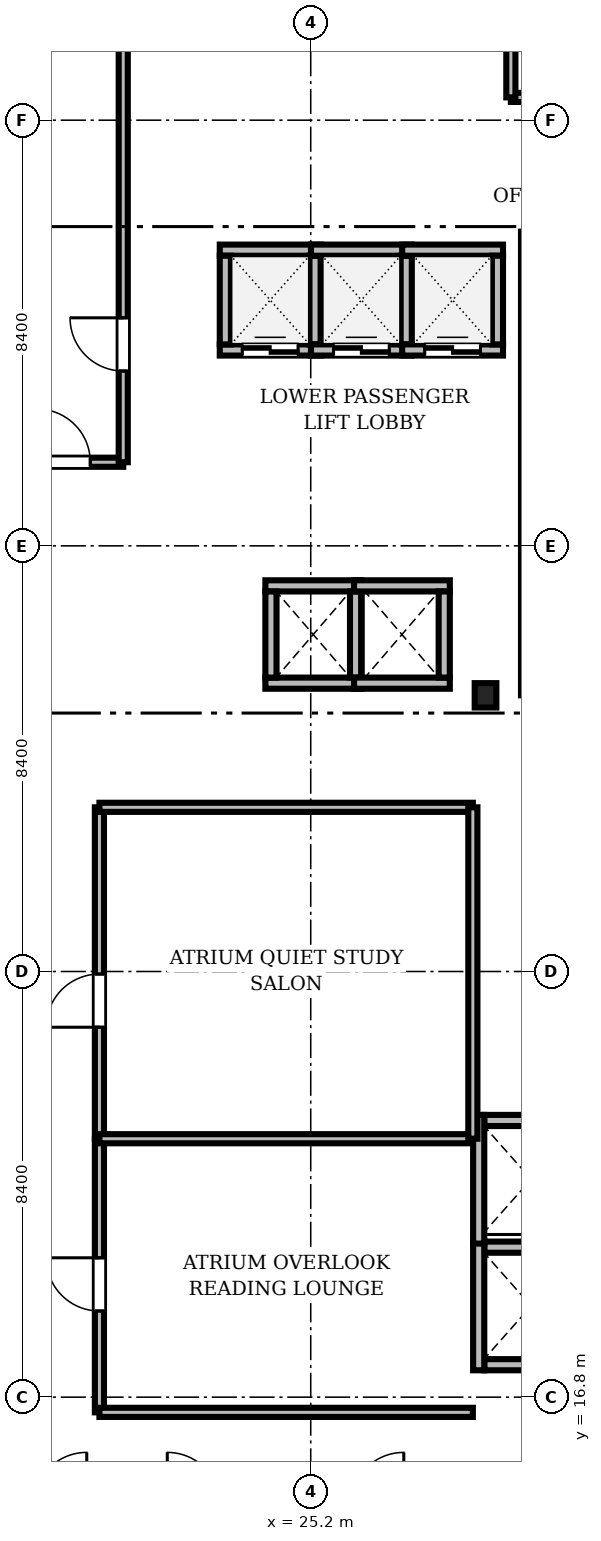
"""IFC4 building model, lengths in metres.
Left out: names, types, materials, properties, quantities, classifications, styles, units other than length and angle.
Written with IfcOpenShell. Run it as: python <this file> out.ifc"""

import sys

from ifc_helpers import new_model, si_unit, direction, frame, frame_2d, origin, origin_2d, place, context, subcontext, project, spatial, rectangle, i_section, extrude, source, transform, mapped, element, fill, save


model = new_model("IFC4")
c1 = context("Model", 3, precision=1e-05, world=origin(), true_north=direction((0.0, 1.0)))
c2 = subcontext(c1, "Body", "Model", "MODEL_VIEW")
j1 = project(units=[si_unit("LENGTHUNIT", "METRE"), si_unit("PLANEANGLEUNIT", "RADIAN")], contexts=[c1])
p1 = place(None, origin())
s1 = spatial("IfcSite", under=j1, at=p1, CompositionType="ELEMENT")
p2 = place(p1, origin())
s2 = spatial("IfcBuilding", under=s1, at=p2, CompositionType="ELEMENT")
p3 = place(p2, frame((0.0, 0.0, 64.1)))
s3 = spatial("IfcBuildingStorey", under=s2, at=p3, CompositionType="ELEMENT", Elevation=64.1)
m1 = source(origin(), c2, "Body", "SweptSolid", [
    extrude(i_section(OverallWidth=0.428, OverallDepth=0.481, WebThickness=0.04, FlangeThickness=0.063, FilletRadius=0.015, at=origin_2d()), origin(), (0.0, 0.0, 1.0), 3.41),
])
p4 = place(p3, frame((28.65, 30.65, 0.0), z_axis=(0.0, 0.0, 1.0), x_axis=(1.0, 0.0, 0.0)))
e1 = element("IfcColumn", 1, at=p4, inside=s3, PredefinedType="COLUMN", context=c2, shape_type="MappedRepresentation", body=[
    mapped(m1, transform((0.0, 0.0, 0.0), scale=1.0)),
])
m2 = source(origin(), c2, "Body", "SweptSolid", [
    extrude(rectangle(XDim=1.99, YDim=0.22, at=frame_2d((0.995, 0.0))), origin(), (0.0, 0.0, 1.0), 3.41),
])
p5 = place(p3, frame((23.405, 37.465, 0.0), z_axis=(0.0, 0.0, 1.0), x_axis=(1.0, 0.0, 0.0)))
e2 = element("IfcWall", 2, at=p5, inside=s3, PredefinedType="SOLIDWALL", context=c2, shape_type="MappedRepresentation", body=[
    mapped(m2, transform((0.0, 0.0, 0.0), scale=1.0)),
])
m3 = source(origin(), c2, "Body", "SweptSolid", [
    extrude(rectangle(XDim=1.1, YDim=2.2, at=frame_2d((0.55, 1.1))), frame((0.0, 0.12, 0.0), z_axis=(0.0, -1.0, 0.0), x_axis=(1.0, 0.0, 0.0)), (0.0, 0.0, 1.0), 0.24),
])
p6 = place(p5, frame((0.445, 0.0, 0.0)))
e3 = element("IfcOpeningElement", 3, at=p6, cuts=e2, PredefinedType="OPENING", context=c2, shape_type="MappedRepresentation", body=[
    mapped(m3, transform((0.0, 0.0, 0.0), scale=1.0)),
])
p7 = place(p3, frame((23.405, 39.435, 0.0), z_axis=(0.0, 0.0, 1.0), x_axis=(1.0, 0.0, 0.0)))
e4 = element("IfcWall", 4, at=p7, inside=s3, PredefinedType="SOLIDWALL", context=c2, shape_type="MappedRepresentation", body=[
    mapped(m2, transform((0.0, 0.0, 0.0), scale=1.0)),
])
m4 = source(origin(), c2, "Body", "SweptSolid", [
    extrude(rectangle(XDim=1.75, YDim=0.22, at=frame_2d((0.875, 0.0))), origin(), (0.0, 0.0, 1.0), 3.41),
])
for number, where, z_axis, x_axis in (
    (5, (23.515, 37.575, 0.0), (0.0, 0.0, 1.0), (0.0, 1.0, 0.0)),
    (6, (25.285, 37.575, 0.0), (0.0, 0.0, 1.0), (0.0, 1.0, 0.0)),
):
    element("IfcWall", number, at=place(p3, frame(where, z_axis=z_axis, x_axis=x_axis)), inside=s3, PredefinedType="SOLIDWALL", context=c2, shape_type="MappedRepresentation", body=[
        mapped(m4, transform((0.0, 0.0, 0.0), scale=1.0)),
    ])
p8 = place(p3, frame((25.205, 37.465, 0.0), z_axis=(0.0, 0.0, 1.0), x_axis=(1.0, 0.0, 0.0)))
e7 = element("IfcWall", 7, at=p8, inside=s3, PredefinedType="SOLIDWALL", context=c2, shape_type="MappedRepresentation", body=[
    mapped(m2, transform((0.0, 0.0, 0.0), scale=1.0)),
])
p9 = place(p8, frame((0.445, 0.0, 0.0)))
e8 = element("IfcOpeningElement", 8, at=p9, cuts=e7, PredefinedType="OPENING", context=c2, shape_type="MappedRepresentation", body=[
    mapped(m3, transform((0.0, 0.0, 0.0), scale=1.0)),
])
p10 = place(p3, frame((25.205, 39.435, 0.0), z_axis=(0.0, 0.0, 1.0), x_axis=(1.0, 0.0, 0.0)))
e9 = element("IfcWall", 9, at=p10, inside=s3, PredefinedType="SOLIDWALL", context=c2, shape_type="MappedRepresentation", body=[
    mapped(m2, transform((0.0, 0.0, 0.0), scale=1.0)),
])
p11 = place(p3, frame((27.085, 37.575, 0.0), z_axis=(0.0, 0.0, 1.0), x_axis=(0.0, 1.0, 0.0)))
e10 = element("IfcWall", 10, at=p11, inside=s3, PredefinedType="SOLIDWALL", context=c2, shape_type="MappedRepresentation", body=[
    mapped(m4, transform((0.0, 0.0, 0.0), scale=1.0)),
])
m5 = source(origin(), c2, "Body", "SweptSolid", [
    extrude(rectangle(XDim=1.99, YDim=0.22, at=frame_2d((0.995, 0.0))), origin(), (0.0, 0.0, 1.0), 3.41),
])
p12 = place(p3, frame((27.005, 37.465, 0.0), z_axis=(0.0, 0.0, 1.0), x_axis=(1.0, 0.0, 0.0)))
e11 = element("IfcWall", 11, at=p12, inside=s3, PredefinedType="SOLIDWALL", context=c2, shape_type="MappedRepresentation", body=[
    mapped(m5, transform((0.0, 0.0, 0.0), scale=1.0)),
])
p13 = place(p12, frame((0.445, 0.0, 0.0)))
e12 = element("IfcOpeningElement", 12, at=p13, cuts=e11, PredefinedType="OPENING", context=c2, shape_type="MappedRepresentation", body=[
    mapped(m3, transform((0.0, 0.0, 0.0), scale=1.0)),
])
p14 = place(p3, frame((27.005, 39.435, 0.0), z_axis=(0.0, 0.0, 1.0), x_axis=(1.0, 0.0, 0.0)))
e13 = element("IfcWall", 13, at=p14, inside=s3, PredefinedType="SOLIDWALL", context=c2, shape_type="MappedRepresentation", body=[
    mapped(m5, transform((0.0, 0.0, 0.0), scale=1.0)),
])
p15 = place(p3, frame((28.885, 37.575, 0.0), z_axis=(0.0, 0.0, 1.0), x_axis=(0.0, 1.0, 0.0)))
e14 = element("IfcWall", 14, at=p15, inside=s3, PredefinedType="SOLIDWALL", context=c2, shape_type="MappedRepresentation", body=[
    mapped(m4, transform((0.0, 0.0, 0.0), scale=1.0)),
])
m6 = source(origin(), c2, "Body", "SweptSolid", [
    extrude(rectangle(XDim=1.89, YDim=0.22, at=frame_2d((0.945, 0.0))), origin(), (0.0, 0.0, 1.0), 3.41),
])
for number, where, z_axis, x_axis in (
    (15, (24.305, 30.89, 0.0), (0.0, 0.0, 1.0), (1.0, 0.0, 0.0)),
    (16, (24.305, 32.81, 0.0), (0.0, 0.0, 1.0), (1.0, 0.0, 0.0)),
):
    element("IfcWall", number, at=place(p3, frame(where, z_axis=z_axis, x_axis=x_axis)), inside=s3, PredefinedType="SOLIDWALL", context=c2, shape_type="MappedRepresentation", body=[
        mapped(m6, transform((0.0, 0.0, 0.0), scale=1.0)),
    ])
m7 = source(origin(), c2, "Body", "SweptSolid", [
    extrude(rectangle(XDim=1.7, YDim=0.22, at=frame_2d((0.85, 0.0))), origin(), (0.0, 0.0, 1.0), 3.41),
])
for number, where, z_axis, x_axis in (
    (17, (24.415, 31.0, 0.0), (0.0, 0.0, 1.0), (0.0, 1.0, 0.0)),
    (18, (26.085, 31.0, 0.0), (0.0, 0.0, 1.0), (0.0, 1.0, 0.0)),
):
    element("IfcWall", number, at=place(p3, frame(where, z_axis=z_axis, x_axis=x_axis)), inside=s3, PredefinedType="SOLIDWALL", context=c2, shape_type="MappedRepresentation", body=[
        mapped(m7, transform((0.0, 0.0, 0.0), scale=1.0)),
    ])
for number, where, z_axis, x_axis in (
    (19, (26.055, 30.89, 0.0), (0.0, 0.0, 1.0), (1.0, 0.0, 0.0)),
    (20, (26.055, 32.81, 0.0), (0.0, 0.0, 1.0), (1.0, 0.0, 0.0)),
):
    element("IfcWall", number, at=place(p3, frame(where, z_axis=z_axis, x_axis=x_axis)), inside=s3, PredefinedType="SOLIDWALL", context=c2, shape_type="MappedRepresentation", body=[
        mapped(m6, transform((0.0, 0.0, 0.0), scale=1.0)),
    ])
p16 = place(p3, frame((27.835, 31.0, 0.0), z_axis=(0.0, 0.0, 1.0), x_axis=(0.0, 1.0, 0.0)))
e21 = element("IfcWall", 21, at=p16, inside=s3, PredefinedType="SOLIDWALL", context=c2, shape_type="MappedRepresentation", body=[
    mapped(m7, transform((0.0, 0.0, 0.0), scale=1.0)),
])
m8 = source(origin(), c2, "Body", "SweptSolid", [
    extrude(rectangle(XDim=1.85, YDim=0.22, at=frame_2d((0.925, 0.0))), origin(), (0.0, 0.0, 1.0), 3.41),
])
for number, where, z_axis, x_axis in (
    (22, (28.625, 17.44, 0.0), (0.0, 0.0, 1.0), (1.0, 0.0, 0.0)),
    (23, (28.625, 19.76, 0.0), (0.0, 0.0, 1.0), (1.0, 0.0, 0.0)),
):
    element("IfcWall", number, at=place(p3, frame(where, z_axis=z_axis, x_axis=x_axis)), inside=s3, PredefinedType="SOLIDWALL", context=c2, shape_type="MappedRepresentation", body=[
        mapped(m8, transform((0.0, 0.0, 0.0), scale=1.0)),
    ])
m9 = source(origin(), c2, "Body", "SweptSolid", [
    extrude(rectangle(XDim=2.54, YDim=0.22, at=frame_2d((1.27, 0.0))), origin(), (0.0, 0.0, 1.0), 3.41),
])
p17 = place(p3, frame((28.515, 17.33, 0.0), z_axis=(0.0, 0.0, 1.0), x_axis=(0.0, 1.0, 0.0)))
e24 = element("IfcWall", 24, at=p17, inside=s3, PredefinedType="SOLIDWALL", context=c2, shape_type="MappedRepresentation", body=[
    mapped(m9, transform((0.0, 0.0, 0.0), scale=1.0)),
])
p18 = place(p3, frame((28.625, 22.26, 0.0), z_axis=(0.0, 0.0, 1.0), x_axis=(1.0, 0.0, 0.0)))
e25 = element("IfcWall", 25, at=p18, inside=s3, PredefinedType="SOLIDWALL", context=c2, shape_type="MappedRepresentation", body=[
    mapped(m8, transform((0.0, 0.0, 0.0), scale=1.0)),
])
p19 = place(p3, frame((28.515, 19.83, 0.0), z_axis=(0.0, 0.0, 1.0), x_axis=(0.0, 1.0, 0.0)))
e26 = element("IfcWall", 26, at=p19, inside=s3, PredefinedType="SOLIDWALL", context=c2, shape_type="MappedRepresentation", body=[
    mapped(m9, transform((0.0, 0.0, 0.0), scale=1.0)),
])
m10 = source(origin(), c2, "Body", "SweptSolid", [
    extrude(rectangle(XDim=19.428, YDim=0.18, at=frame_2d((9.714, 0.0))), origin(), (0.0, 0.0, 1.0), 2.652),
])
p20 = place(p3, frame((29.15, 42.45, 0.0), z_axis=(0.0, 0.0, 1.0), x_axis=(1.0, 0.0, 0.0)))
e27 = element("IfcWall", 27, at=p20, inside=s3, PredefinedType="PARTITIONING", context=c2, shape_type="MappedRepresentation", body=[
    mapped(m10, transform((0.0, 0.0, 0.0), scale=1.0)),
])
m11 = source(origin(), c2, "Body", "SweptSolid", [
    extrude(rectangle(XDim=1.05, YDim=2.2, at=frame_2d((0.525, 1.1))), frame((0.0, 0.1, 0.0), z_axis=(0.0, -1.0, 0.0), x_axis=(1.0, 0.0, 0.0)), (0.0, 0.0, 1.0), 0.2),
])
p21 = place(p20, frame((4.5, 0.0, 0.0)))
e28 = element("IfcOpeningElement", 28, at=p21, cuts=e27, PredefinedType="OPENING", context=c2, shape_type="MappedRepresentation", body=[
    mapped(m11, transform((0.0, 0.0, 0.0), scale=1.0)),
])
m12 = source(origin(), c2, "Body", "SweptSolid", [
    extrude(rectangle(XDim=19.078, YDim=0.18, at=frame_2d((9.539, 0.0))), origin(), (0.0, 0.0, 1.0), 2.652),
])
p22 = place(p3, frame((2.422, 35.25, 0.0), z_axis=(0.0, 0.0, 1.0), x_axis=(1.0, 0.0, 0.0)))
e29 = element("IfcWall", 29, at=p22, inside=s3, PredefinedType="PARTITIONING", context=c2, shape_type="MappedRepresentation", body=[
    mapped(m12, transform((0.0, 0.0, 0.0), scale=1.0)),
])
p23 = place(p22, frame((17.378, 0.0, 0.0)))
e30 = element("IfcOpeningElement", 30, at=p23, cuts=e29, PredefinedType="OPENING", context=c2, shape_type="MappedRepresentation", body=[
    mapped(m11, transform((0.0, 0.0, 0.0), scale=1.0)),
])
m13 = source(origin(), c2, "Body", "SweptSolid", [
    extrude(rectangle(XDim=13.028, YDim=0.18, at=frame_2d((6.514, 0.0))), origin(), (0.0, 0.0, 1.0), 2.652),
])
p24 = place(p3, frame((21.5, 35.25, 0.0), z_axis=(0.0, 0.0, 1.0), x_axis=(0.0, 1.0, 0.0)))
e31 = element("IfcWall", 31, at=p24, inside=s3, PredefinedType="PARTITIONING", context=c2, shape_type="MappedRepresentation", body=[
    mapped(m13, transform((0.0, 0.0, 0.0), scale=1.0)),
])
p25 = place(p24, frame((1.8, 0.0, 0.0)))
e32 = element("IfcOpeningElement", 32, at=p25, cuts=e31, PredefinedType="OPENING", context=c2, shape_type="MappedRepresentation", body=[
    mapped(m11, transform((0.0, 0.0, 0.0), scale=1.0)),
])
m14 = source(origin(), c2, "Body", "SweptSolid", [
    extrude(rectangle(XDim=6.54, YDim=0.18, at=frame_2d((3.27, 0.0))), origin(), (0.0, 0.0, 1.0), 2.802),
])
p26 = place(p3, frame((21.03, 21.9, 0.0), z_axis=(0.0, 0.0, 1.0), x_axis=(0.0, 1.0, 0.0)))
e33 = element("IfcWall", 33, at=p26, inside=s3, PredefinedType="PARTITIONING", context=c2, shape_type="MappedRepresentation", body=[
    mapped(m14, transform((0.0, 0.0, 0.0), scale=1.0)),
])
p27 = place(p26, frame((2.2, 0.0, 0.0)))
e34 = element("IfcOpeningElement", 34, at=p27, cuts=e33, PredefinedType="OPENING", context=c2, shape_type="MappedRepresentation", body=[
    mapped(m11, transform((0.0, 0.0, 0.0), scale=1.0)),
])
m15 = source(origin(), c2, "Body", "SweptSolid", [
    extrude(rectangle(XDim=5.4, YDim=0.18, at=frame_2d((2.7, 0.0))), origin(), (0.0, 0.0, 1.0), 2.802),
])
p28 = place(p3, frame((21.03, 16.5, 0.0), z_axis=(0.0, 0.0, 1.0), x_axis=(0.0, 1.0, 0.0)))
e35 = element("IfcWall", 35, at=p28, inside=s3, PredefinedType="PARTITIONING", context=c2, shape_type="MappedRepresentation", body=[
    mapped(m15, transform((0.0, 0.0, 0.0), scale=1.0)),
])
p29 = place(p28, frame((2.0, 0.0, 0.0)))
e36 = element("IfcOpeningElement", 36, at=p29, cuts=e35, PredefinedType="OPENING", context=c2, shape_type="MappedRepresentation", body=[
    mapped(m11, transform((0.0, 0.0, 0.0), scale=1.0)),
])
m16 = source(origin(), c2, "Body", "SweptSolid", [
    extrude(rectangle(XDim=7.37, YDim=0.18, at=frame_2d((3.685, 0.0))), origin(), (0.0, 0.0, 1.0), 2.802),
])
p30 = place(p3, frame((21.03, 16.5, 0.0), z_axis=(0.0, 0.0, 1.0), x_axis=(1.0, 0.0, 0.0)))
e37 = element("IfcWall", 37, at=p30, inside=s3, PredefinedType="PARTITIONING", context=c2, shape_type="MappedRepresentation", body=[
    mapped(m16, transform((0.0, 0.0, 0.0), scale=1.0)),
])
m17 = source(origin(), c2, "Body", "SweptSolid", [
    extrude(rectangle(XDim=7.37, YDim=0.18, at=frame_2d((3.685, 0.0))), origin(), (0.0, 0.0, 1.0), 3.41),
])
for number, where, z_axis, x_axis in (
    (38, (21.03, 21.9, 0.0), (0.0, 0.0, 1.0), (1.0, 0.0, 0.0)),
    (39, (21.03, 28.44, 0.0), (0.0, 0.0, 1.0), (1.0, 0.0, 0.0)),
):
    element("IfcWall", number, at=place(p3, frame(where, z_axis=z_axis, x_axis=x_axis)), inside=s3, PredefinedType="PARTITIONING", context=c2, shape_type="MappedRepresentation", body=[
        mapped(m17, transform((0.0, 0.0, 0.0), scale=1.0)),
    ])
p31 = place(p3, frame((28.4, 21.9, 0.0), z_axis=(0.0, 0.0, 1.0), x_axis=(0.0, 1.0, 0.0)))
e40 = element("IfcWall", 40, at=p31, inside=s3, PredefinedType="PARTITIONING", context=c2, shape_type="MappedRepresentation", body=[
    mapped(m14, transform((0.0, 0.0, 0.0), scale=1.0)),
])
m18 = source(origin(), c2, "Body", "SweptSolid", [
    extrude(rectangle(XDim=5.828, YDim=0.18, at=frame_2d((2.914, 0.0))), origin(), (0.0, 0.0, 1.0), 2.652),
])
p32 = place(p3, frame((29.15, 42.45, 0.0), z_axis=(0.0, 0.0, 1.0), x_axis=(0.0, 1.0, 0.0)))
e41 = element("IfcWall", 41, at=p32, inside=s3, PredefinedType="PARTITIONING", context=c2, shape_type="MappedRepresentation", body=[
    mapped(m18, transform((0.0, 0.0, 0.0), scale=1.0)),
])
m19 = source(origin(), c2, "Body", "SweptSolid", [
    extrude(rectangle(XDim=1.1, YDim=2.2, at=frame_2d((0.55, 1.1))), frame((0.0, 0.025, 0.0), z_axis=(0.0, -1.0, 0.0), x_axis=(1.0, 0.0, 0.0)), (0.0, 0.0, 1.0), 0.05),
])
p33 = place(p6, origin())
e42 = element("IfcDoor", 42, at=p33, inside=s3, OperationType="DOUBLE_DOOR_SLIDING", PredefinedType="DOOR", context=c2, shape_type="MappedRepresentation", body=[
    mapped(m19, transform((0.0, 0.0, 0.0), scale=1.0)),
])
fill(e3, e42)
p34 = place(p9, origin())
e43 = element("IfcDoor", 43, at=p34, inside=s3, OperationType="DOUBLE_DOOR_SLIDING", PredefinedType="DOOR", context=c2, shape_type="MappedRepresentation", body=[
    mapped(m19, transform((0.0, 0.0, 0.0), scale=1.0)),
])
fill(e8, e43)
p35 = place(p13, origin())
e44 = element("IfcDoor", 44, at=p35, inside=s3, OperationType="DOUBLE_DOOR_SLIDING", PredefinedType="DOOR", context=c2, shape_type="MappedRepresentation", body=[
    mapped(m19, transform((0.0, 0.0, 0.0), scale=1.0)),
])
fill(e12, e44)
m20 = source(origin(), c2, "Body", "SweptSolid", [
    extrude(rectangle(XDim=1.05, YDim=2.2, at=frame_2d((0.525, 1.1))), frame((0.0, 0.025, 0.0), z_axis=(0.0, -1.0, 0.0), x_axis=(1.0, 0.0, 0.0)), (0.0, 0.0, 1.0), 0.05),
])
p36 = place(p23, origin())
e45 = element("IfcDoor", 45, at=p36, inside=s3, OperationType="SINGLE_SWING_LEFT", PredefinedType="DOOR", context=c2, shape_type="MappedRepresentation", body=[
    mapped(m20, transform((0.0, 0.0, 0.0), scale=1.0)),
])
fill(e30, e45)
p37 = place(p25, origin())
e46 = element("IfcDoor", 46, at=p37, inside=s3, OperationType="SINGLE_SWING_RIGHT", PredefinedType="DOOR", context=c2, shape_type="MappedRepresentation", body=[
    mapped(m20, transform((0.0, 0.0, 0.0), scale=1.0)),
])
fill(e32, e46)
p38 = place(p27, origin())
e47 = element("IfcDoor", 47, at=p38, inside=s3, OperationType="SINGLE_SWING_LEFT", PredefinedType="DOOR", context=c2, shape_type="MappedRepresentation", body=[
    mapped(m20, transform((0.0, 0.0, 0.0), scale=1.0)),
])
fill(e34, e47)
p39 = place(p29, origin())
e48 = element("IfcDoor", 48, at=p39, inside=s3, OperationType="SINGLE_SWING_RIGHT", PredefinedType="DOOR", context=c2, shape_type="MappedRepresentation", body=[
    mapped(m20, transform((0.0, 0.0, 0.0), scale=1.0)),
])
fill(e36, e48)
save(model, sys.argv[1])
